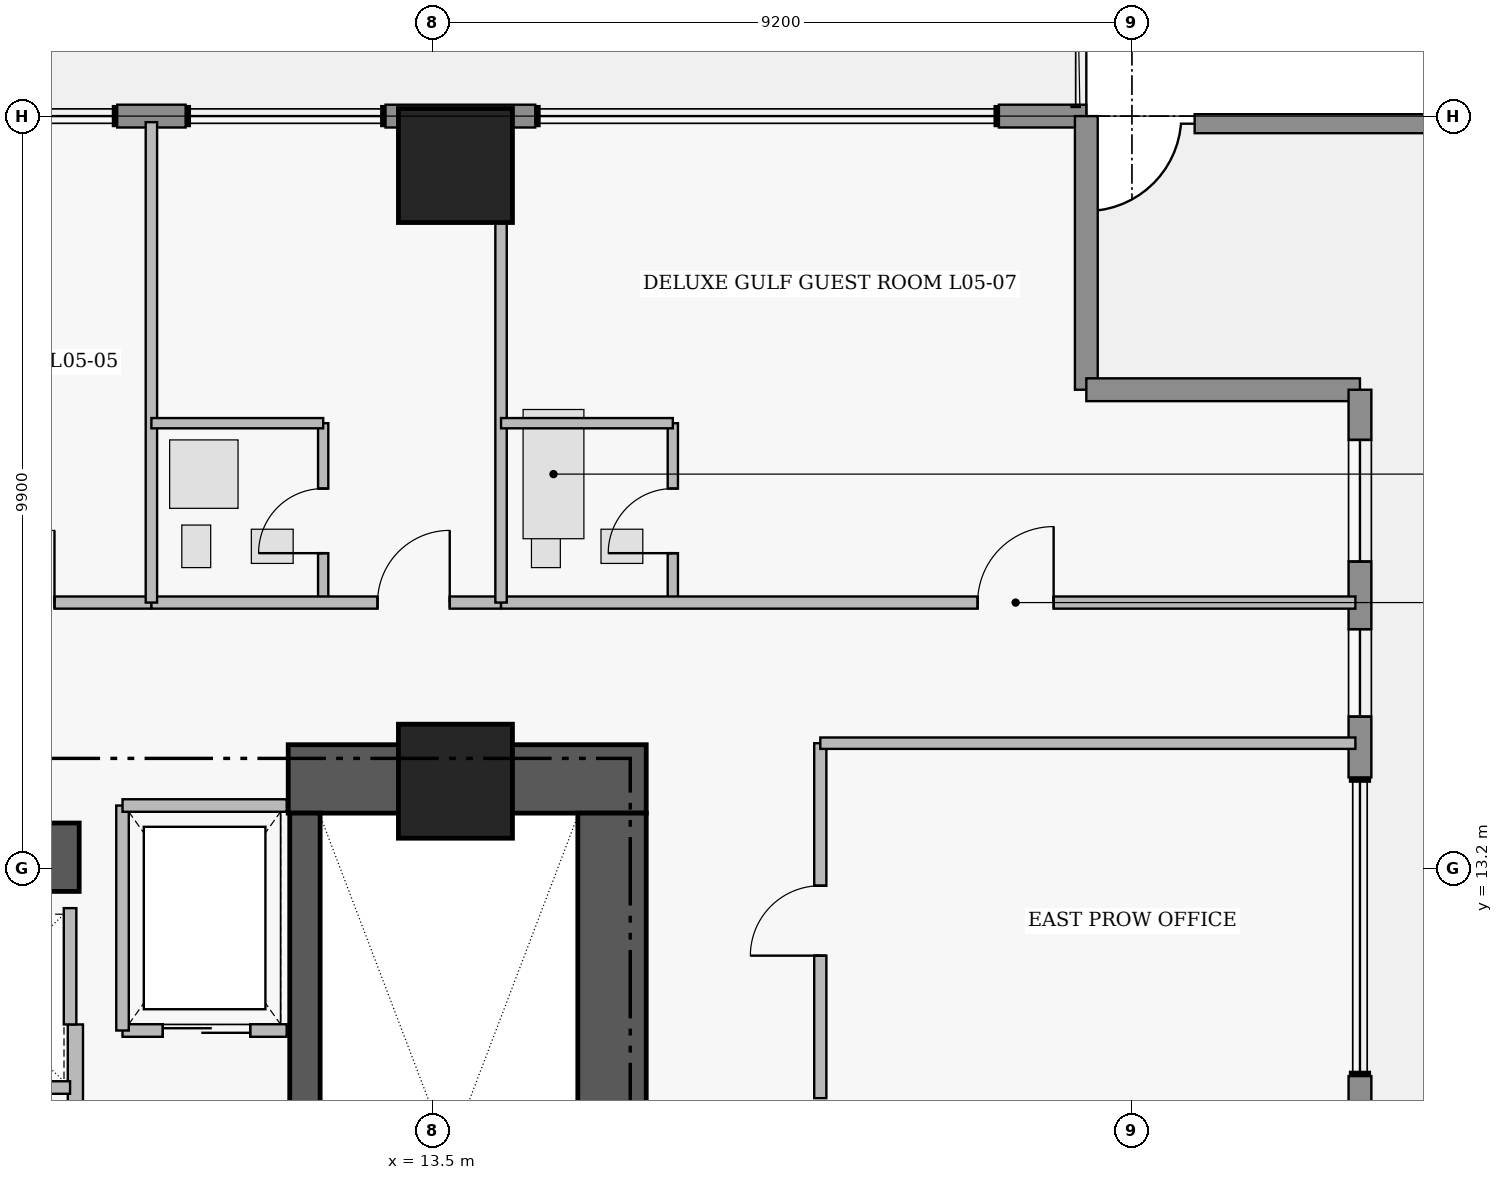
"""IFC4 building model, lengths in metres.
Left out: names, types, materials, properties, quantities, classifications, styles, units other than length and angle.
Written with IfcOpenShell. Run it as: python <this file> out.ifc"""

import sys

from ifc_helpers import new_model, si_unit, direction, frame, frame_2d, origin, origin_2d, place, context, subcontext, project, spatial, rectangle, extrude, element, fill, save


model = new_model("IFC4")
c1 = context("Model", 3, precision=1e-05, world=origin(), true_north=direction((0.0, 1.0)))
c2 = subcontext(c1, "Body", "Model", "MODEL_VIEW")
j1 = project(units=[si_unit("LENGTHUNIT", "METRE"), si_unit("PLANEANGLEUNIT", "RADIAN")], contexts=[c1])
p1 = place(None, origin())
s1 = spatial("IfcSite", under=j1, at=p1, CompositionType="ELEMENT")
p2 = place(p1, origin())
s2 = spatial("IfcBuilding", under=s1, at=p2, CompositionType="ELEMENT")
p3 = place(p2, frame((0.0, 0.0, 27.6)))
s3 = spatial("IfcBuildingStorey", under=s2, at=p3, CompositionType="ELEMENT", Elevation=27.6)
p4 = place(p3, frame((11.6, 14.38, 0.0), z_axis=(0.0, 0.0, 1.0), x_axis=(1.0, 0.0, 0.0)))
e1 = element("IfcWall", 1, at=p4, inside=s3, PredefinedType="SHEAR", context=c2, shape_type="SweptSolid", body=[
    extrude(rectangle(XDim=4.71, YDim=0.9, at=frame_2d((2.355, 0.0))), origin(), (0.0, 0.0, 1.0), 3.46),
])
p5 = place(p3, frame((15.86, 4.97, 0.0), z_axis=(0.0, 0.0, 1.0), x_axis=(0.0, 1.0, 0.0)))
e2 = element("IfcWall", 2, at=p5, inside=s3, PredefinedType="SHEAR", context=c2, shape_type="SweptSolid", body=[
    extrude(rectangle(XDim=8.96, YDim=0.9, at=frame_2d((4.48, 0.0))), origin(), (0.0, 0.0, 1.0), 3.46),
])
p6 = place(p3, frame((1.25, 13.35, 0.0), z_axis=(0.0, 0.0, 1.0), x_axis=(1.0, 0.0, 0.0)))
e3 = element("IfcWall", 3, at=p6, inside=s3, PredefinedType="SHEAR", context=c2, shape_type="SweptSolid", body=[
    extrude(rectangle(XDim=7.6, YDim=0.9, at=frame_2d((3.8, 0.0))), origin(), (0.0, 0.0, 1.0), 3.43),
])
p7 = place(p3, frame((11.82, 13.93, 0.0), z_axis=(0.0, 0.0, 1.0), x_axis=(0.0, -1.0, 0.0)))
e4 = element("IfcWall", 4, at=p7, inside=s3, PredefinedType="SHEAR", context=c2, shape_type="SweptSolid", body=[
    extrude(rectangle(XDim=8.96, YDim=0.4, at=frame_2d((4.48, 0.0))), origin(), (0.0, 0.0, 1.0), 3.46),
])
p8 = place(p7, frame((7.53, 0.0, 0.0)))
e5 = element("IfcOpeningElement", 5, at=p8, cuts=e4, PredefinedType="OPENING", context=c2, shape_type="SweptSolid", body=[
    extrude(rectangle(XDim=1.12, YDim=2.22, at=frame_2d((0.56, 1.11))), frame((0.0, 0.21, 0.0), z_axis=(0.0, -1.0, 0.0), x_axis=(1.0, 0.0, 0.0)), (0.0, 0.0, 1.0), 0.42),
])
for number, where, z_axis, x_axis in (
    (6, (13.8, 14.35, 0.0), (0.0, 0.0, 1.0), (1.0, 0.0, 0.0)),
    (7, (13.8, 22.45, 0.0), (0.0, 0.0, 1.0), (1.0, 0.0, 0.0)),
):
    element("IfcColumn", number, at=place(p3, frame(where, z_axis=z_axis, x_axis=x_axis)), inside=s3, PredefinedType="COLUMN", context=c2, shape_type="SweptSolid", body=[
        extrude(rectangle(XDim=1.5, YDim=1.5, at=origin_2d()), origin(), (0.0, 0.0, 1.0), 3.65),
    ])
p9 = place(p3, frame((23.525, 23.0, 0.0), z_axis=(0.0, 0.0, 1.0), x_axis=(1.0, 0.0, 0.0)))
e8 = element("IfcWall", 8, at=p9, inside=s3, PredefinedType="PARAPET", context=c2, shape_type="SweptSolid", body=[
    extrude(rectangle(XDim=8.295, YDim=0.25, at=frame_2d((4.147, 0.0))), origin(), (0.0, 0.0, 1.0), 1.15),
])
p10 = place(p3, frame((9.35, 23.1, 0.0), z_axis=(0.0, 0.0, 1.0), x_axis=(1.0, 0.0, 0.0)))
e9 = element("IfcWall", 9, at=p10, inside=s3, PredefinedType="STANDARD", context=c2, shape_type="SweptSolid", body=[
    extrude(rectangle(XDim=0.9, YDim=0.3, at=frame_2d((0.45, 0.0))), origin(), (0.0, 0.0, 1.0), 3.43),
])
p11 = place(p3, frame((12.88, 23.1, 0.0), z_axis=(0.0, 0.0, 1.0), x_axis=(1.0, 0.0, 0.0)))
e10 = element("IfcWall", 10, at=p11, inside=s3, PredefinedType="STANDARD", context=c2, shape_type="SweptSolid", body=[
    extrude(rectangle(XDim=1.97, YDim=0.3, at=frame_2d((0.985, 0.0))), origin(), (0.0, 0.0, 1.0), 3.43),
])
p12 = place(p3, frame((20.95, 23.1, 0.0), z_axis=(0.0, 0.0, 1.0), x_axis=(1.0, 0.0, 0.0)))
e11 = element("IfcWall", 11, at=p12, inside=s3, PredefinedType="STANDARD", context=c2, shape_type="SweptSolid", body=[
    extrude(rectangle(XDim=1.15, YDim=0.3, at=frame_2d((0.575, 0.0))), origin(), (0.0, 0.0, 1.0), 3.43),
])
p13 = place(p3, frame((22.1, 23.1, 0.0), z_axis=(0.0, 0.0, 1.0), x_axis=(0.0, -1.0, 0.0)))
e12 = element("IfcWall", 12, at=p13, inside=s3, PredefinedType="STANDARD", context=c2, shape_type="SweptSolid", body=[
    extrude(rectangle(XDim=3.6, YDim=0.3, at=frame_2d((1.8, 0.0))), origin(), (0.0, 0.0, 1.0), 3.43),
])
p14 = place(p3, frame((22.1, 19.5, 0.0), z_axis=(0.0, 0.0, 1.0), x_axis=(1.0, 0.0, 0.0)))
e13 = element("IfcWall", 13, at=p14, inside=s3, PredefinedType="STANDARD", context=c2, shape_type="SweptSolid", body=[
    extrude(rectangle(XDim=3.6, YDim=0.3, at=frame_2d((1.8, 0.0))), origin(), (0.0, 0.0, 1.0), 3.43),
])
p15 = place(p3, frame((25.7, 19.5, 0.0), z_axis=(0.0, 0.0, 1.0), x_axis=(0.0, -1.0, 0.0)))
e14 = element("IfcWall", 14, at=p15, inside=s3, PredefinedType="STANDARD", context=c2, shape_type="SweptSolid", body=[
    extrude(rectangle(XDim=5.1, YDim=0.3, at=frame_2d((2.55, 0.0))), origin(), (0.0, 0.0, 1.0), 3.43),
])
p16 = place(p15, frame((0.66, 0.0, 0.85)))
e15 = element("IfcOpeningElement", 15, at=p16, cuts=e14, PredefinedType="OPENING", context=c2, shape_type="SweptSolid", body=[
    extrude(rectangle(XDim=1.6, YDim=1.8, at=frame_2d((0.8, 0.9))), frame((0.0, 0.16, 0.0), z_axis=(0.0, -1.0, 0.0), x_axis=(1.0, 0.0, 0.0)), (0.0, 0.0, 1.0), 0.32),
])
p17 = place(p15, frame((3.15, 0.0, 0.95)))
e16 = element("IfcOpeningElement", 16, at=p17, cuts=e14, PredefinedType="OPENING", context=c2, shape_type="SweptSolid", body=[
    extrude(rectangle(XDim=1.15, YDim=1.55, at=frame_2d((0.575, 0.775))), frame((0.0, 0.16, 0.0), z_axis=(0.0, -1.0, 0.0), x_axis=(1.0, 0.0, 0.0)), (0.0, 0.0, 1.0), 0.32),
])
p18 = place(p3, frame((25.7, 10.47, 0.0), z_axis=(0.0, 0.0, 1.0), x_axis=(0.0, -1.0, 0.0)))
e17 = element("IfcWall", 17, at=p18, inside=s3, PredefinedType="STANDARD", context=c2, shape_type="SweptSolid", body=[
    extrude(rectangle(XDim=0.9, YDim=0.3, at=frame_2d((0.45, 0.0))), origin(), (0.0, 0.0, 1.0), 3.43),
])
p19 = place(p3, frame((8.8, 11.15, 0.0), z_axis=(0.0, 0.0, 1.0), x_axis=(0.0, -1.0, 0.0)))
e18 = element("IfcWall", 18, at=p19, inside=s3, PredefinedType="PARTITIONING", context=c2, shape_type="SweptSolid", body=[
    extrude(rectangle(XDim=6.1, YDim=0.2, at=frame_2d((3.05, 0.0))), origin(), (0.0, 0.0, 1.0), 3.43),
])
p20 = place(p19, frame((1.15, 0.0, 0.0)))
e19 = element("IfcOpeningElement", 19, at=p20, cuts=e18, PredefinedType="OPENING", context=c2, shape_type="SweptSolid", body=[
    extrude(rectangle(XDim=1.1, YDim=2.2, at=frame_2d((0.55, 1.1))), frame((0.0, 0.11, 0.0), z_axis=(0.0, -1.0, 0.0), x_axis=(1.0, 0.0, 0.0)), (0.0, 0.0, 1.0), 0.22),
])
p21 = place(p19, frame((4.75, 0.0, 0.0)))
e20 = element("IfcOpeningElement", 20, at=p21, cuts=e18, PredefinedType="OPENING", context=c2, shape_type="SweptSolid", body=[
    extrude(rectangle(XDim=1.1, YDim=2.2, at=frame_2d((0.55, 1.1))), frame((0.0, 0.11, 0.0), z_axis=(0.0, -1.0, 0.0), x_axis=(1.0, 0.0, 0.0)), (0.0, 0.0, 1.0), 0.22),
])
p22 = place(p3, frame((9.42, 11.07, 0.0), z_axis=(0.0, 0.0, 1.0), x_axis=(1.0, 0.0, 0.0)))
e21 = element("IfcWall", 21, at=p22, inside=s3, PredefinedType="PARTITIONING", context=c2, shape_type="SweptSolid", body=[
    extrude(rectangle(XDim=2.16, YDim=0.165, at=frame_2d((1.08, 0.0))), origin(), (0.0, 0.0, 1.0), 3.43),
])
p23 = place(p22, frame((0.53, 0.0, 0.0)))
e22 = element("IfcOpeningElement", 22, at=p23, cuts=e21, PredefinedType="OPENING", context=c2, shape_type="SweptSolid", body=[
    extrude(rectangle(XDim=1.15, YDim=2.25, at=frame_2d((0.575, 1.125))), frame((0.0, 0.093, 0.0), z_axis=(0.0, -1.0, 0.0), x_axis=(1.0, 0.0, 0.0)), (0.0, 0.0, 1.0), 0.185),
])
p24 = place(p3, frame((4.0, 16.7, 0.0), z_axis=(0.0, 0.0, 1.0), x_axis=(1.0, 0.0, 0.0)))
e23 = element("IfcWall", 23, at=p24, inside=s3, PredefinedType="PARTITIONING", context=c2, shape_type="SweptSolid", body=[
    extrude(rectangle(XDim=5.8, YDim=0.16, at=frame_2d((2.9, 0.0))), origin(), (0.0, 0.0, 1.0), 2.973),
])
p25 = place(p24, frame((3.575, 0.0, 0.0)))
e24 = element("IfcOpeningElement", 24, at=p25, cuts=e23, PredefinedType="OPENING", context=c2, shape_type="SweptSolid", body=[
    extrude(rectangle(XDim=0.95, YDim=2.15, at=frame_2d((0.475, 1.075))), frame((0.0, 0.09, 0.0), z_axis=(0.0, -1.0, 0.0), x_axis=(1.0, 0.0, 0.0)), (0.0, 0.0, 1.0), 0.18),
])
p26 = place(p3, frame((12.06, 16.7, 0.0), z_axis=(0.0, 0.0, 1.0), x_axis=(0.0, 1.0, 0.0)))
e25 = element("IfcWall", 25, at=p26, inside=s3, PredefinedType="PLUMBINGWALL", context=c2, shape_type="SweptSolid", body=[
    extrude(rectangle(XDim=2.36, YDim=0.135, at=frame_2d((1.18, 0.0))), origin(), (0.0, 0.0, 1.0), 3.43),
])
p27 = place(p26, frame((0.65, 0.0, 0.0)))
e26 = element("IfcOpeningElement", 26, at=p27, cuts=e25, PredefinedType="OPENING", context=c2, shape_type="SweptSolid", body=[
    extrude(rectangle(XDim=0.85, YDim=2.1, at=frame_2d((0.425, 1.05))), frame((0.0, 0.077, 0.0), z_axis=(0.0, -1.0, 0.0), x_axis=(1.0, 0.0, 0.0)), (0.0, 0.0, 1.0), 0.155),
])
p28 = place(p3, frame((9.8, 16.7, 0.0), z_axis=(0.0, 0.0, 1.0), x_axis=(1.0, 0.0, 0.0)))
e27 = element("IfcWall", 27, at=p28, inside=s3, PredefinedType="PARTITIONING", context=c2, shape_type="SweptSolid", body=[
    extrude(rectangle(XDim=4.6, YDim=0.16, at=frame_2d((2.3, 0.0))), origin(), (0.0, 0.0, 1.0), 2.973),
])
p29 = place(p28, frame((2.975, 0.0, 0.0)))
e28 = element("IfcOpeningElement", 28, at=p29, cuts=e27, PredefinedType="OPENING", context=c2, shape_type="SweptSolid", body=[
    extrude(rectangle(XDim=0.95, YDim=2.15, at=frame_2d((0.475, 1.075))), frame((0.0, 0.09, 0.0), z_axis=(0.0, -1.0, 0.0), x_axis=(1.0, 0.0, 0.0)), (0.0, 0.0, 1.0), 0.18),
])
p30 = place(p3, frame((16.66, 16.7, 0.0), z_axis=(0.0, 0.0, 1.0), x_axis=(0.0, 1.0, 0.0)))
e29 = element("IfcWall", 29, at=p30, inside=s3, PredefinedType="PLUMBINGWALL", context=c2, shape_type="SweptSolid", body=[
    extrude(rectangle(XDim=2.36, YDim=0.135, at=frame_2d((1.18, 0.0))), origin(), (0.0, 0.0, 1.0), 3.43),
])
p31 = place(p30, frame((0.65, 0.0, 0.0)))
e30 = element("IfcOpeningElement", 30, at=p31, cuts=e29, PredefinedType="OPENING", context=c2, shape_type="SweptSolid", body=[
    extrude(rectangle(XDim=0.85, YDim=2.1, at=frame_2d((0.425, 1.05))), frame((0.0, 0.077, 0.0), z_axis=(0.0, -1.0, 0.0), x_axis=(1.0, 0.0, 0.0)), (0.0, 0.0, 1.0), 0.155),
])
p32 = place(p3, frame((14.4, 16.7, 0.0), z_axis=(0.0, 0.0, 1.0), x_axis=(1.0, 0.0, 0.0)))
e31 = element("IfcWall", 31, at=p32, inside=s3, PredefinedType="PARTITIONING", context=c2, shape_type="SweptSolid", body=[
    extrude(rectangle(XDim=11.24, YDim=0.16, at=frame_2d((5.62, 0.0))), origin(), (0.0, 0.0, 1.0), 3.43),
])
p33 = place(p32, frame((6.27, 0.0, 0.0)))
e32 = element("IfcOpeningElement", 32, at=p33, cuts=e31, PredefinedType="OPENING", context=c2, shape_type="SweptSolid", body=[
    extrude(rectangle(XDim=1.0, YDim=2.15, at=frame_2d((0.5, 1.075))), frame((0.0, 0.09, 0.0), z_axis=(0.0, -1.0, 0.0), x_axis=(1.0, 0.0, 0.0)), (0.0, 0.0, 1.0), 0.18),
])
p34 = place(p3, frame((18.6, 10.18, 0.0), z_axis=(0.0, 0.0, 1.0), x_axis=(0.0, 1.0, 0.0)))
e33 = element("IfcWall", 33, at=p34, inside=s3, PredefinedType="PARTITIONING", context=c2, shape_type="SweptSolid", body=[
    extrude(rectangle(XDim=4.67, YDim=0.16, at=frame_2d((2.335, 0.0))), origin(), (0.0, 0.0, 1.0), 3.43),
])
p35 = place(p34, frame((1.875, 0.0, 0.0)))
e34 = element("IfcOpeningElement", 34, at=p35, cuts=e33, PredefinedType="OPENING", context=c2, shape_type="SweptSolid", body=[
    extrude(rectangle(XDim=0.92, YDim=2.12, at=frame_2d((0.46, 1.06))), frame((0.0, 0.09, 0.0), z_axis=(0.0, -1.0, 0.0), x_axis=(1.0, 0.0, 0.0)), (0.0, 0.0, 1.0), 0.18),
])
p36 = place(p3, frame((9.42, 11.07, 0.0), z_axis=(0.0, 0.0, 1.0), x_axis=(0.0, 1.0, 0.0)))
e35 = element("IfcWall", 35, at=p36, inside=s3, PredefinedType="PARTITIONING", context=c2, shape_type="SweptSolid", body=[
    extrude(rectangle(XDim=2.96, YDim=0.165, at=frame_2d((1.48, 0.0))), origin(), (0.0, 0.0, 1.0), 3.43),
])
p37 = place(p3, frame((9.42, 14.03, 0.0), z_axis=(0.0, 0.0, 1.0), x_axis=(1.0, 0.0, 0.0)))
e36 = element("IfcWall", 36, at=p37, inside=s3, PredefinedType="PARTITIONING", context=c2, shape_type="SweptSolid", body=[
    extrude(rectangle(XDim=2.16, YDim=0.165, at=frame_2d((1.08, 0.0))), origin(), (0.0, 0.0, 1.0), 3.43),
])
p38 = place(p3, frame((6.25, 10.32, 0.0), z_axis=(0.0, 0.0, 1.0), x_axis=(1.0, 0.0, 0.0)))
e37 = element("IfcWall", 37, at=p38, inside=s3, PredefinedType="PARTITIONING", context=c2, shape_type="SweptSolid", body=[
    extrude(rectangle(XDim=2.48, YDim=0.165, at=frame_2d((1.24, 0.0))), origin(), (0.0, 0.0, 1.0), 3.43),
])
p39 = place(p3, frame((8.73, 11.15, 0.0), z_axis=(0.0, 0.0, 1.0), x_axis=(0.0, 1.0, 0.0)))
e38 = element("IfcWall", 38, at=p39, inside=s3, PredefinedType="PARTITIONING", context=c2, shape_type="SweptSolid", body=[
    extrude(rectangle(XDim=1.53, YDim=0.165, at=frame_2d((0.765, 0.0))), origin(), (0.0, 0.0, 1.0), 3.43),
])
p40 = place(p3, frame((9.8, 16.7, 0.0), z_axis=(0.0, 0.0, 1.0), x_axis=(0.0, 1.0, 0.0)))
e39 = element("IfcWall", 39, at=p40, inside=s3, PredefinedType="PARTITIONING", context=c2, shape_type="SweptSolid", body=[
    extrude(rectangle(XDim=6.32, YDim=0.15, at=frame_2d((3.16, 0.0))), origin(), (0.0, 0.0, 1.0), 3.43),
])
p41 = place(p3, frame((9.8, 19.06, 0.0), z_axis=(0.0, 0.0, 1.0), x_axis=(1.0, 0.0, 0.0)))
e40 = element("IfcWall", 40, at=p41, inside=s3, PredefinedType="PLUMBINGWALL", context=c2, shape_type="SweptSolid", body=[
    extrude(rectangle(XDim=2.26, YDim=0.135, at=frame_2d((1.13, 0.0))), origin(), (0.0, 0.0, 1.0), 2.973),
])
p42 = place(p3, frame((14.4, 16.7, 0.0), z_axis=(0.0, 0.0, 1.0), x_axis=(0.0, 1.0, 0.0)))
e41 = element("IfcWall", 41, at=p42, inside=s3, PredefinedType="PARTITIONING", context=c2, shape_type="SweptSolid", body=[
    extrude(rectangle(XDim=6.32, YDim=0.15, at=frame_2d((3.16, 0.0))), origin(), (0.0, 0.0, 1.0), 3.43),
])
p43 = place(p3, frame((14.4, 19.06, 0.0), z_axis=(0.0, 0.0, 1.0), x_axis=(1.0, 0.0, 0.0)))
e42 = element("IfcWall", 42, at=p43, inside=s3, PredefinedType="PLUMBINGWALL", context=c2, shape_type="SweptSolid", body=[
    extrude(rectangle(XDim=2.26, YDim=0.135, at=frame_2d((1.13, 0.0))), origin(), (0.0, 0.0, 1.0), 3.43),
])
p44 = place(p3, frame((18.6, 14.85, 0.0), z_axis=(0.0, 0.0, 1.0), x_axis=(1.0, 0.0, 0.0)))
e43 = element("IfcWall", 43, at=p44, inside=s3, PredefinedType="PARTITIONING", context=c2, shape_type="SweptSolid", body=[
    extrude(rectangle(XDim=7.04, YDim=0.15, at=frame_2d((3.52, 0.0))), origin(), (0.0, 0.0, 1.0), 3.43),
])
p45 = place(p16, origin())
e44 = element("IfcWindow", 44, at=p45, inside=s3, PartitioningType="SINGLE_PANEL", PredefinedType="WINDOW", context=c2, shape_type="SweptSolid", body=[
    extrude(rectangle(XDim=1.6, YDim=1.8, at=frame_2d((0.8, 0.9))), frame((0.0, 0.03, 0.0), z_axis=(0.0, -1.0, 0.0), x_axis=(1.0, 0.0, 0.0)), (0.0, 0.0, 1.0), 0.06),
])
fill(e15, e44)
p46 = place(p17, origin())
e45 = element("IfcWindow", 45, at=p46, inside=s3, PartitioningType="SINGLE_PANEL", PredefinedType="WINDOW", context=c2, shape_type="SweptSolid", body=[
    extrude(rectangle(XDim=1.15, YDim=1.55, at=frame_2d((0.575, 0.775))), frame((0.0, 0.03, 0.0), z_axis=(0.0, -1.0, 0.0), x_axis=(1.0, 0.0, 0.0)), (0.0, 0.0, 1.0), 0.06),
])
fill(e16, e45)
p47 = place(p23, origin())
e46 = element("IfcDoor", 46, at=p47, inside=s3, OperationType="SLIDING_TO_LEFT", PredefinedType="DOOR", context=c2, shape_type="SweptSolid", body=[
    extrude(rectangle(XDim=1.15, YDim=2.25, at=frame_2d((0.575, 1.125))), frame((0.0, 0.025, 0.0), z_axis=(0.0, -1.0, 0.0), x_axis=(1.0, 0.0, 0.0)), (0.0, 0.0, 1.0), 0.05),
])
fill(e22, e46)
p48 = place(p25, origin())
e47 = element("IfcDoor", 47, at=p48, inside=s3, OperationType="SINGLE_SWING_RIGHT", PredefinedType="DOOR", context=c2, shape_type="SweptSolid", body=[
    extrude(rectangle(XDim=0.95, YDim=2.15, at=frame_2d((0.475, 1.075))), frame((0.0, 0.025, 0.0), z_axis=(0.0, -1.0, 0.0), x_axis=(1.0, 0.0, 0.0)), (0.0, 0.0, 1.0), 0.05),
])
fill(e24, e47)
p49 = place(p27, origin())
e48 = element("IfcDoor", 48, at=p49, inside=s3, OperationType="SINGLE_SWING_LEFT", PredefinedType="DOOR", context=c2, shape_type="SweptSolid", body=[
    extrude(rectangle(XDim=0.85, YDim=2.1, at=frame_2d((0.425, 1.05))), frame((0.0, 0.025, 0.0), z_axis=(0.0, -1.0, 0.0), x_axis=(1.0, 0.0, 0.0)), (0.0, 0.0, 1.0), 0.05),
])
fill(e26, e48)
p50 = place(p29, origin())
e49 = element("IfcDoor", 49, at=p50, inside=s3, OperationType="SINGLE_SWING_RIGHT", PredefinedType="DOOR", context=c2, shape_type="SweptSolid", body=[
    extrude(rectangle(XDim=0.95, YDim=2.15, at=frame_2d((0.475, 1.075))), frame((0.0, 0.025, 0.0), z_axis=(0.0, -1.0, 0.0), x_axis=(1.0, 0.0, 0.0)), (0.0, 0.0, 1.0), 0.05),
])
fill(e28, e49)
p51 = place(p31, origin())
e50 = element("IfcDoor", 50, at=p51, inside=s3, OperationType="SINGLE_SWING_LEFT", PredefinedType="DOOR", context=c2, shape_type="SweptSolid", body=[
    extrude(rectangle(XDim=0.85, YDim=2.1, at=frame_2d((0.425, 1.05))), frame((0.0, 0.025, 0.0), z_axis=(0.0, -1.0, 0.0), x_axis=(1.0, 0.0, 0.0)), (0.0, 0.0, 1.0), 0.05),
])
fill(e30, e50)
p52 = place(p33, origin())
e51 = element("IfcDoor", 51, at=p52, inside=s3, OperationType="SINGLE_SWING_RIGHT", PredefinedType="DOOR", context=c2, shape_type="SweptSolid", body=[
    extrude(rectangle(XDim=1.0, YDim=2.15, at=frame_2d((0.5, 1.075))), frame((0.0, 0.025, 0.0), z_axis=(0.0, -1.0, 0.0), x_axis=(1.0, 0.0, 0.0)), (0.0, 0.0, 1.0), 0.05),
])
fill(e32, e51)
p53 = place(p35, origin())
e52 = element("IfcDoor", 52, at=p53, inside=s3, OperationType="SINGLE_SWING_LEFT", PredefinedType="DOOR", context=c2, shape_type="SweptSolid", body=[
    extrude(rectangle(XDim=0.92, YDim=2.12, at=frame_2d((0.46, 1.06))), frame((0.0, 0.025, 0.0), z_axis=(0.0, -1.0, 0.0), x_axis=(1.0, 0.0, 0.0)), (0.0, 0.0, 1.0), 0.05),
])
fill(e34, e52)
save(model, sys.argv[1])
